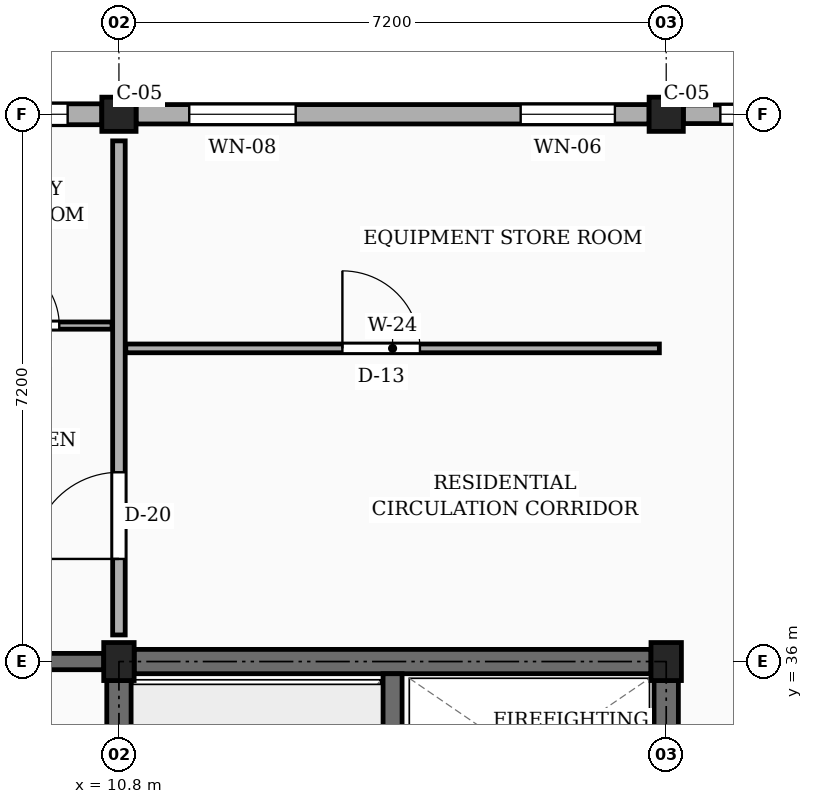
"""IFC4 building model, lengths in metres.
Left out: names, types, materials, properties, quantities, classifications, styles, units other than length and angle.
Written with IfcOpenShell. Run it as: python <this file> out.ifc"""

import sys

from ifc_helpers import new_model, si_unit, direction, frame, frame_2d, origin, origin_2d, place, context, subcontext, project, spatial, rectangle, extrude, element, fill, save


model = new_model("IFC4")
c1 = context("Model", 3, precision=1e-05, world=origin(), true_north=direction((0.0, 1.0)))
c2 = subcontext(c1, "Body", "Model", "MODEL_VIEW")
j1 = project(units=[si_unit("LENGTHUNIT", "METRE"), si_unit("PLANEANGLEUNIT", "RADIAN")], contexts=[c1])
p1 = place(None, origin())
s1 = spatial("IfcSite", under=j1, at=p1, CompositionType="ELEMENT")
p2 = place(p1, origin())
s2 = spatial("IfcBuilding", under=s1, at=p2, CompositionType="ELEMENT")
p3 = place(p2, frame((0.0, 0.0, 36.0)))
s3 = spatial("IfcBuildingStorey", under=s2, at=p3, CompositionType="ELEMENT", Elevation=36.0)
p4 = place(p3, frame((10.8, 36.0, 0.0), z_axis=(0.0, 0.0, 1.0), x_axis=(1.0, 0.0, 0.0)))
e1 = element("IfcColumn", 1, at=p4, inside=s3, PredefinedType="COLUMN", context=c2, shape_type="SweptSolid", body=[
    extrude(rectangle(XDim=0.4, YDim=0.5, at=origin_2d()), origin(), (0.0, 0.0, 1.0), 3.15),
])
p5 = place(p3, frame((10.8, 43.2, 0.0), z_axis=(0.0, 0.0, 1.0), x_axis=(1.0, 0.0, 0.0)))
e2 = element("IfcColumn", 2, at=p5, inside=s3, PredefinedType="COLUMN", context=c2, shape_type="SweptSolid", body=[
    extrude(rectangle(XDim=0.45, YDim=0.45, at=origin_2d()), origin(), (0.0, 0.0, 1.0), 3.15),
])
p6 = place(p3, frame((18.0, 36.0, 0.0), z_axis=(0.0, 0.0, 1.0), x_axis=(1.0, 0.0, 0.0)))
e3 = element("IfcColumn", 3, at=p6, inside=s3, PredefinedType="COLUMN", context=c2, shape_type="SweptSolid", body=[
    extrude(rectangle(XDim=0.4, YDim=0.5, at=origin_2d()), origin(), (0.0, 0.0, 1.0), 3.15),
])
p7 = place(p3, frame((18.0, 43.2, 0.0), z_axis=(0.0, 0.0, 1.0), x_axis=(1.0, 0.0, 0.0)))
e4 = element("IfcColumn", 4, at=p7, inside=s3, PredefinedType="COLUMN", context=c2, shape_type="SweptSolid", body=[
    extrude(rectangle(XDim=0.45, YDim=0.45, at=origin_2d()), origin(), (0.0, 0.0, 1.0), 3.15),
])
p8 = place(p3, frame((3.825, 36.0, 0.0), z_axis=(0.0, 0.0, 1.0), x_axis=(1.0, 0.0, 0.0)))
e5 = element("IfcWall", 5, at=p8, inside=s3, PredefinedType="SOLIDWALL", context=c2, shape_type="SweptSolid", body=[
    extrude(rectangle(XDim=6.775, YDim=0.215, at=frame_2d((3.388, 0.0))), origin(), (0.0, 0.0, 1.0), 2.17),
])
p9 = place(p3, frame((24.975, 43.2, 0.0), z_axis=(0.0, 0.0, 1.0), x_axis=(-1.0, 0.0, 0.0)))
e6 = element("IfcWall", 6, at=p9, inside=s3, PredefinedType="SOLIDWALL", context=c2, shape_type="SweptSolid", body=[
    extrude(rectangle(XDim=6.75, YDim=0.245, at=frame_2d((3.375, 0.0))), origin(), (0.0, 0.0, 1.0), 2.44),
])
p10 = place(p9, frame((1.018, 0.0, 0.78)))
e7 = element("IfcOpeningElement", 7, at=p10, cuts=e6, PredefinedType="OPENING", context=c2, shape_type="SweptSolid", body=[
    extrude(rectangle(XDim=1.0, YDim=1.15, at=frame_2d((0.5, 0.575))), frame((0.0, 0.133, 0.0), z_axis=(0.0, -1.0, 0.0), x_axis=(1.0, 0.0, 0.0)), (0.0, 0.0, 1.0), 0.265),
])
p11 = place(p9, frame((3.305, 0.0, 0.78)))
e8 = element("IfcOpeningElement", 8, at=p11, cuts=e6, PredefinedType="OPENING", context=c2, shape_type="SweptSolid", body=[
    extrude(rectangle(XDim=1.16, YDim=1.15, at=frame_2d((0.58, 0.575))), frame((0.0, 0.133, 0.0), z_axis=(0.0, -1.0, 0.0), x_axis=(1.0, 0.0, 0.0)), (0.0, 0.0, 1.0), 0.265),
])
p12 = place(p9, frame((5.222, 0.0, 0.78)))
e9 = element("IfcOpeningElement", 9, at=p12, cuts=e6, PredefinedType="OPENING", context=c2, shape_type="SweptSolid", body=[
    extrude(rectangle(XDim=1.04, YDim=1.26, at=frame_2d((0.52, 0.63))), frame((0.0, 0.133, 0.0), z_axis=(0.0, -1.0, 0.0), x_axis=(1.0, 0.0, 0.0)), (0.0, 0.0, 1.0), 0.265),
])
p13 = place(p3, frame((17.775, 43.2, 0.0), z_axis=(0.0, 0.0, 1.0), x_axis=(-1.0, 0.0, 0.0)))
e10 = element("IfcWall", 10, at=p13, inside=s3, PredefinedType="SOLIDWALL", context=c2, shape_type="SweptSolid", body=[
    extrude(rectangle(XDim=6.75, YDim=0.255, at=frame_2d((3.375, 0.0))), origin(), (0.0, 0.0, 1.0), 2.44),
])
p14 = place(p13, frame((0.45, 0.0, 0.78)))
e11 = element("IfcOpeningElement", 11, at=p14, cuts=e10, PredefinedType="OPENING", context=c2, shape_type="SweptSolid", body=[
    extrude(rectangle(XDim=1.24, YDim=1.15, at=frame_2d((0.62, 0.575))), frame((0.0, 0.137, 0.0), z_axis=(0.0, -1.0, 0.0), x_axis=(1.0, 0.0, 0.0)), (0.0, 0.0, 1.0), 0.275),
])
p15 = place(p13, frame((4.65, 0.0, 0.78)))
e12 = element("IfcOpeningElement", 12, at=p15, cuts=e10, PredefinedType="OPENING", context=c2, shape_type="SweptSolid", body=[
    extrude(rectangle(XDim=1.4, YDim=1.15, at=frame_2d((0.7, 0.575))), frame((0.0, 0.137, 0.0), z_axis=(0.0, -1.0, 0.0), x_axis=(1.0, 0.0, 0.0)), (0.0, 0.0, 1.0), 0.275),
])
p16 = place(p3, frame((10.575, 43.2, 0.0), z_axis=(0.0, 0.0, 1.0), x_axis=(-1.0, 0.0, 0.0)))
e13 = element("IfcWall", 13, at=p16, inside=s3, PredefinedType="SOLIDWALL", context=c2, shape_type="SweptSolid", body=[
    extrude(rectangle(XDim=6.75, YDim=0.275, at=frame_2d((3.375, 0.0))), origin(), (0.0, 0.0, 1.0), 2.44),
])
p17 = place(p16, frame((0.45, 0.0, 0.78)))
e14 = element("IfcOpeningElement", 14, at=p17, cuts=e13, PredefinedType="OPENING", context=c2, shape_type="SweptSolid", body=[
    extrude(rectangle(XDim=1.4, YDim=1.15, at=frame_2d((0.7, 0.575))), frame((0.0, 0.147, 0.0), z_axis=(0.0, -1.0, 0.0), x_axis=(1.0, 0.0, 0.0)), (0.0, 0.0, 1.0), 0.295),
])
p18 = place(p16, frame((4.65, 0.0, 0.78)))
e15 = element("IfcOpeningElement", 15, at=p18, cuts=e13, PredefinedType="OPENING", context=c2, shape_type="SweptSolid", body=[
    extrude(rectangle(XDim=0.96, YDim=1.26, at=frame_2d((0.48, 0.63))), frame((0.0, 0.147, 0.0), z_axis=(0.0, -1.0, 0.0), x_axis=(1.0, 0.0, 0.0)), (0.0, 0.0, 1.0), 0.295),
])
p19 = place(p3, frame((10.8, 29.05, 0.0), z_axis=(0.0, 0.0, 1.0), x_axis=(0.0, 1.0, 0.0)))
e16 = element("IfcWall", 16, at=p19, inside=s3, PredefinedType="SHEAR", context=c2, shape_type="SweptSolid", body=[
    extrude(rectangle(XDim=6.7, YDim=0.32, at=frame_2d((3.35, 0.0))), origin(), (0.0, 0.0, 1.0), 2.87),
])
p20 = place(p3, frame((11.0, 36.0, 0.0), z_axis=(0.0, 0.0, 1.0), x_axis=(1.0, 0.0, 0.0)))
e17 = element("IfcWall", 17, at=p20, inside=s3, PredefinedType="SHEAR", context=c2, shape_type="SweptSolid", body=[
    extrude(rectangle(XDim=6.8, YDim=0.32, at=frame_2d((3.4, 0.0))), origin(), (0.0, 0.0, 1.0), 2.87),
])
p21 = place(p3, frame((18.0, 29.05, 0.0), z_axis=(0.0, 0.0, 1.0), x_axis=(0.0, 1.0, 0.0)))
e18 = element("IfcWall", 18, at=p21, inside=s3, PredefinedType="SHEAR", context=c2, shape_type="SweptSolid", body=[
    extrude(rectangle(XDim=6.7, YDim=0.32, at=frame_2d((3.35, 0.0))), origin(), (0.0, 0.0, 1.0), 2.87),
])
p22 = place(p21, frame((1.5, 0.0, 0.0)))
e19 = element("IfcOpeningElement", 19, at=p22, cuts=e18, PredefinedType="OPENING", context=c2, shape_type="SweptSolid", body=[
    extrude(rectangle(XDim=1.1, YDim=2.15, at=frame_2d((0.55, 1.075))), frame((0.0, 0.17, 0.0), z_axis=(0.0, -1.0, 0.0), x_axis=(1.0, 0.0, 0.0)), (0.0, 0.0, 1.0), 0.34),
])
p23 = place(p3, frame((14.4, 28.96, 0.0), z_axis=(0.0, 0.0, 1.0), x_axis=(0.0, 1.0, 0.0)))
e20 = element("IfcWall", 20, at=p23, inside=s3, PredefinedType="SHEAR", context=c2, shape_type="SweptSolid", body=[
    extrude(rectangle(XDim=6.88, YDim=0.25, at=frame_2d((3.44, 0.0))), origin(), (0.0, 0.0, 1.0), 2.87),
])
p24 = place(p23, frame((0.44, 0.0, 0.0)))
e21 = element("IfcOpeningElement", 21, at=p24, cuts=e20, PredefinedType="OPENING", context=c2, shape_type="SweptSolid", body=[
    extrude(rectangle(XDim=1.05, YDim=2.15, at=frame_2d((0.525, 1.075))), frame((0.0, 0.135, 0.0), z_axis=(0.0, -1.0, 0.0), x_axis=(1.0, 0.0, 0.0)), (0.0, 0.0, 1.0), 0.27),
])
p25 = place(p3, frame((10.8, 36.35, 0.0), z_axis=(0.0, 0.0, 1.0), x_axis=(0.0, 1.0, 0.0)))
e22 = element("IfcWall", 22, at=p25, inside=s3, PredefinedType="PARTITIONING", context=c2, shape_type="SweptSolid", body=[
    extrude(rectangle(XDim=6.5, YDim=0.165, at=frame_2d((3.25, 0.0))), origin(), (0.0, 0.0, 1.0), 2.305),
])
p26 = place(p25, frame((1.0, 0.0, 0.0)))
e23 = element("IfcOpeningElement", 23, at=p26, cuts=e22, PredefinedType="OPENING", context=c2, shape_type="SweptSolid", body=[
    extrude(rectangle(XDim=1.14, YDim=2.18, at=frame_2d((0.57, 1.09))), frame((0.0, 0.093, 0.0), z_axis=(0.0, -1.0, 0.0), x_axis=(1.0, 0.0, 0.0)), (0.0, 0.0, 1.0), 0.185),
])
p27 = place(p3, frame((10.89, 40.12, 0.0), z_axis=(0.0, 0.0, 1.0), x_axis=(1.0, 0.0, 0.0)))
e24 = element("IfcWall", 24, at=p27, inside=s3, PredefinedType="PARTITIONING", context=c2, shape_type="SweptSolid", body=[
    extrude(rectangle(XDim=7.02, YDim=0.115, at=frame_2d((3.51, 0.0))), origin(), (0.0, 0.0, 1.0), 2.305),
])
p28 = place(p27, frame((2.85, 0.0, 0.0)))
e25 = element("IfcOpeningElement", 25, at=p28, cuts=e24, PredefinedType="OPENING", context=c2, shape_type="SweptSolid", body=[
    extrude(rectangle(XDim=1.02, YDim=2.15, at=frame_2d((0.51, 1.075))), frame((0.0, 0.067, 0.0), z_axis=(0.0, -1.0, 0.0), x_axis=(1.0, 0.0, 0.0)), (0.0, 0.0, 1.0), 0.135),
])
p29 = place(p3, frame((8.45, 40.42, 0.0), z_axis=(0.0, 0.0, 1.0), x_axis=(1.0, 0.0, 0.0)))
e26 = element("IfcWall", 26, at=p29, inside=s3, PredefinedType="PARTITIONING", context=c2, shape_type="SweptSolid", body=[
    extrude(rectangle(XDim=2.26, YDim=0.095, at=frame_2d((1.13, 0.0))), origin(), (0.0, 0.0, 1.0), 2.305),
])
p30 = place(p29, frame((0.695, 0.0, 0.0)))
e27 = element("IfcOpeningElement", 27, at=p30, cuts=e26, PredefinedType="OPENING", context=c2, shape_type="SweptSolid", body=[
    extrude(rectangle(XDim=0.87, YDim=2.05, at=frame_2d((0.435, 1.025))), frame((0.0, 0.058, 0.0), z_axis=(0.0, -1.0, 0.0), x_axis=(1.0, 0.0, 0.0)), (0.0, 0.0, 1.0), 0.115),
])
p31 = place(p12, origin())
e28 = element("IfcWindow", 28, at=p31, inside=s3, PartitioningType="SINGLE_PANEL", PredefinedType="WINDOW", context=c2, shape_type="SweptSolid", body=[
    extrude(rectangle(XDim=1.04, YDim=1.26, at=frame_2d((0.52, 0.63))), frame((0.0, 0.03, 0.0), z_axis=(0.0, -1.0, 0.0), x_axis=(1.0, 0.0, 0.0)), (0.0, 0.0, 1.0), 0.06),
])
fill(e9, e28)
p32 = place(p14, origin())
e29 = element("IfcWindow", 29, at=p32, inside=s3, PartitioningType="SINGLE_PANEL", PredefinedType="WINDOW", context=c2, shape_type="SweptSolid", body=[
    extrude(rectangle(XDim=1.24, YDim=1.15, at=frame_2d((0.62, 0.575))), frame((0.0, 0.03, 0.0), z_axis=(0.0, -1.0, 0.0), x_axis=(1.0, 0.0, 0.0)), (0.0, 0.0, 1.0), 0.06),
])
fill(e11, e29)
p33 = place(p15, origin())
e30 = element("IfcWindow", 30, at=p33, inside=s3, PartitioningType="SINGLE_PANEL", PredefinedType="WINDOW", context=c2, shape_type="SweptSolid", body=[
    extrude(rectangle(XDim=1.4, YDim=1.15, at=frame_2d((0.7, 0.575))), frame((0.0, 0.03, 0.0), z_axis=(0.0, -1.0, 0.0), x_axis=(1.0, 0.0, 0.0)), (0.0, 0.0, 1.0), 0.06),
])
fill(e12, e30)
p34 = place(p17, origin())
e31 = element("IfcWindow", 31, at=p34, inside=s3, PartitioningType="SINGLE_PANEL", PredefinedType="WINDOW", context=c2, shape_type="SweptSolid", body=[
    extrude(rectangle(XDim=1.4, YDim=1.15, at=frame_2d((0.7, 0.575))), frame((0.0, 0.03, 0.0), z_axis=(0.0, -1.0, 0.0), x_axis=(1.0, 0.0, 0.0)), (0.0, 0.0, 1.0), 0.06),
])
fill(e14, e31)
p35 = place(p26, origin())
e32 = element("IfcDoor", 32, at=p35, inside=s3, OperationType="SINGLE_SWING_LEFT", PredefinedType="DOOR", context=c2, shape_type="SweptSolid", body=[
    extrude(rectangle(XDim=1.14, YDim=2.18, at=frame_2d((0.57, 1.09))), frame((0.0, 0.025, 0.0), z_axis=(0.0, -1.0, 0.0), x_axis=(1.0, 0.0, 0.0)), (0.0, 0.0, 1.0), 0.05),
])
fill(e23, e32)
p36 = place(p28, origin())
e33 = element("IfcDoor", 33, at=p36, inside=s3, OperationType="SINGLE_SWING_LEFT", PredefinedType="DOOR", context=c2, shape_type="SweptSolid", body=[
    extrude(rectangle(XDim=1.02, YDim=2.15, at=frame_2d((0.51, 1.075))), frame((0.0, 0.025, 0.0), z_axis=(0.0, -1.0, 0.0), x_axis=(1.0, 0.0, 0.0)), (0.0, 0.0, 1.0), 0.05),
])
fill(e25, e33)
p37 = place(p30, origin())
e34 = element("IfcDoor", 34, at=p37, inside=s3, OperationType="SINGLE_SWING_LEFT", PredefinedType="DOOR", context=c2, shape_type="SweptSolid", body=[
    extrude(rectangle(XDim=0.87, YDim=2.05, at=frame_2d((0.435, 1.025))), frame((0.0, 0.025, 0.0), z_axis=(0.0, -1.0, 0.0), x_axis=(1.0, 0.0, 0.0)), (0.0, 0.0, 1.0), 0.05),
])
fill(e27, e34)
save(model, sys.argv[1])
